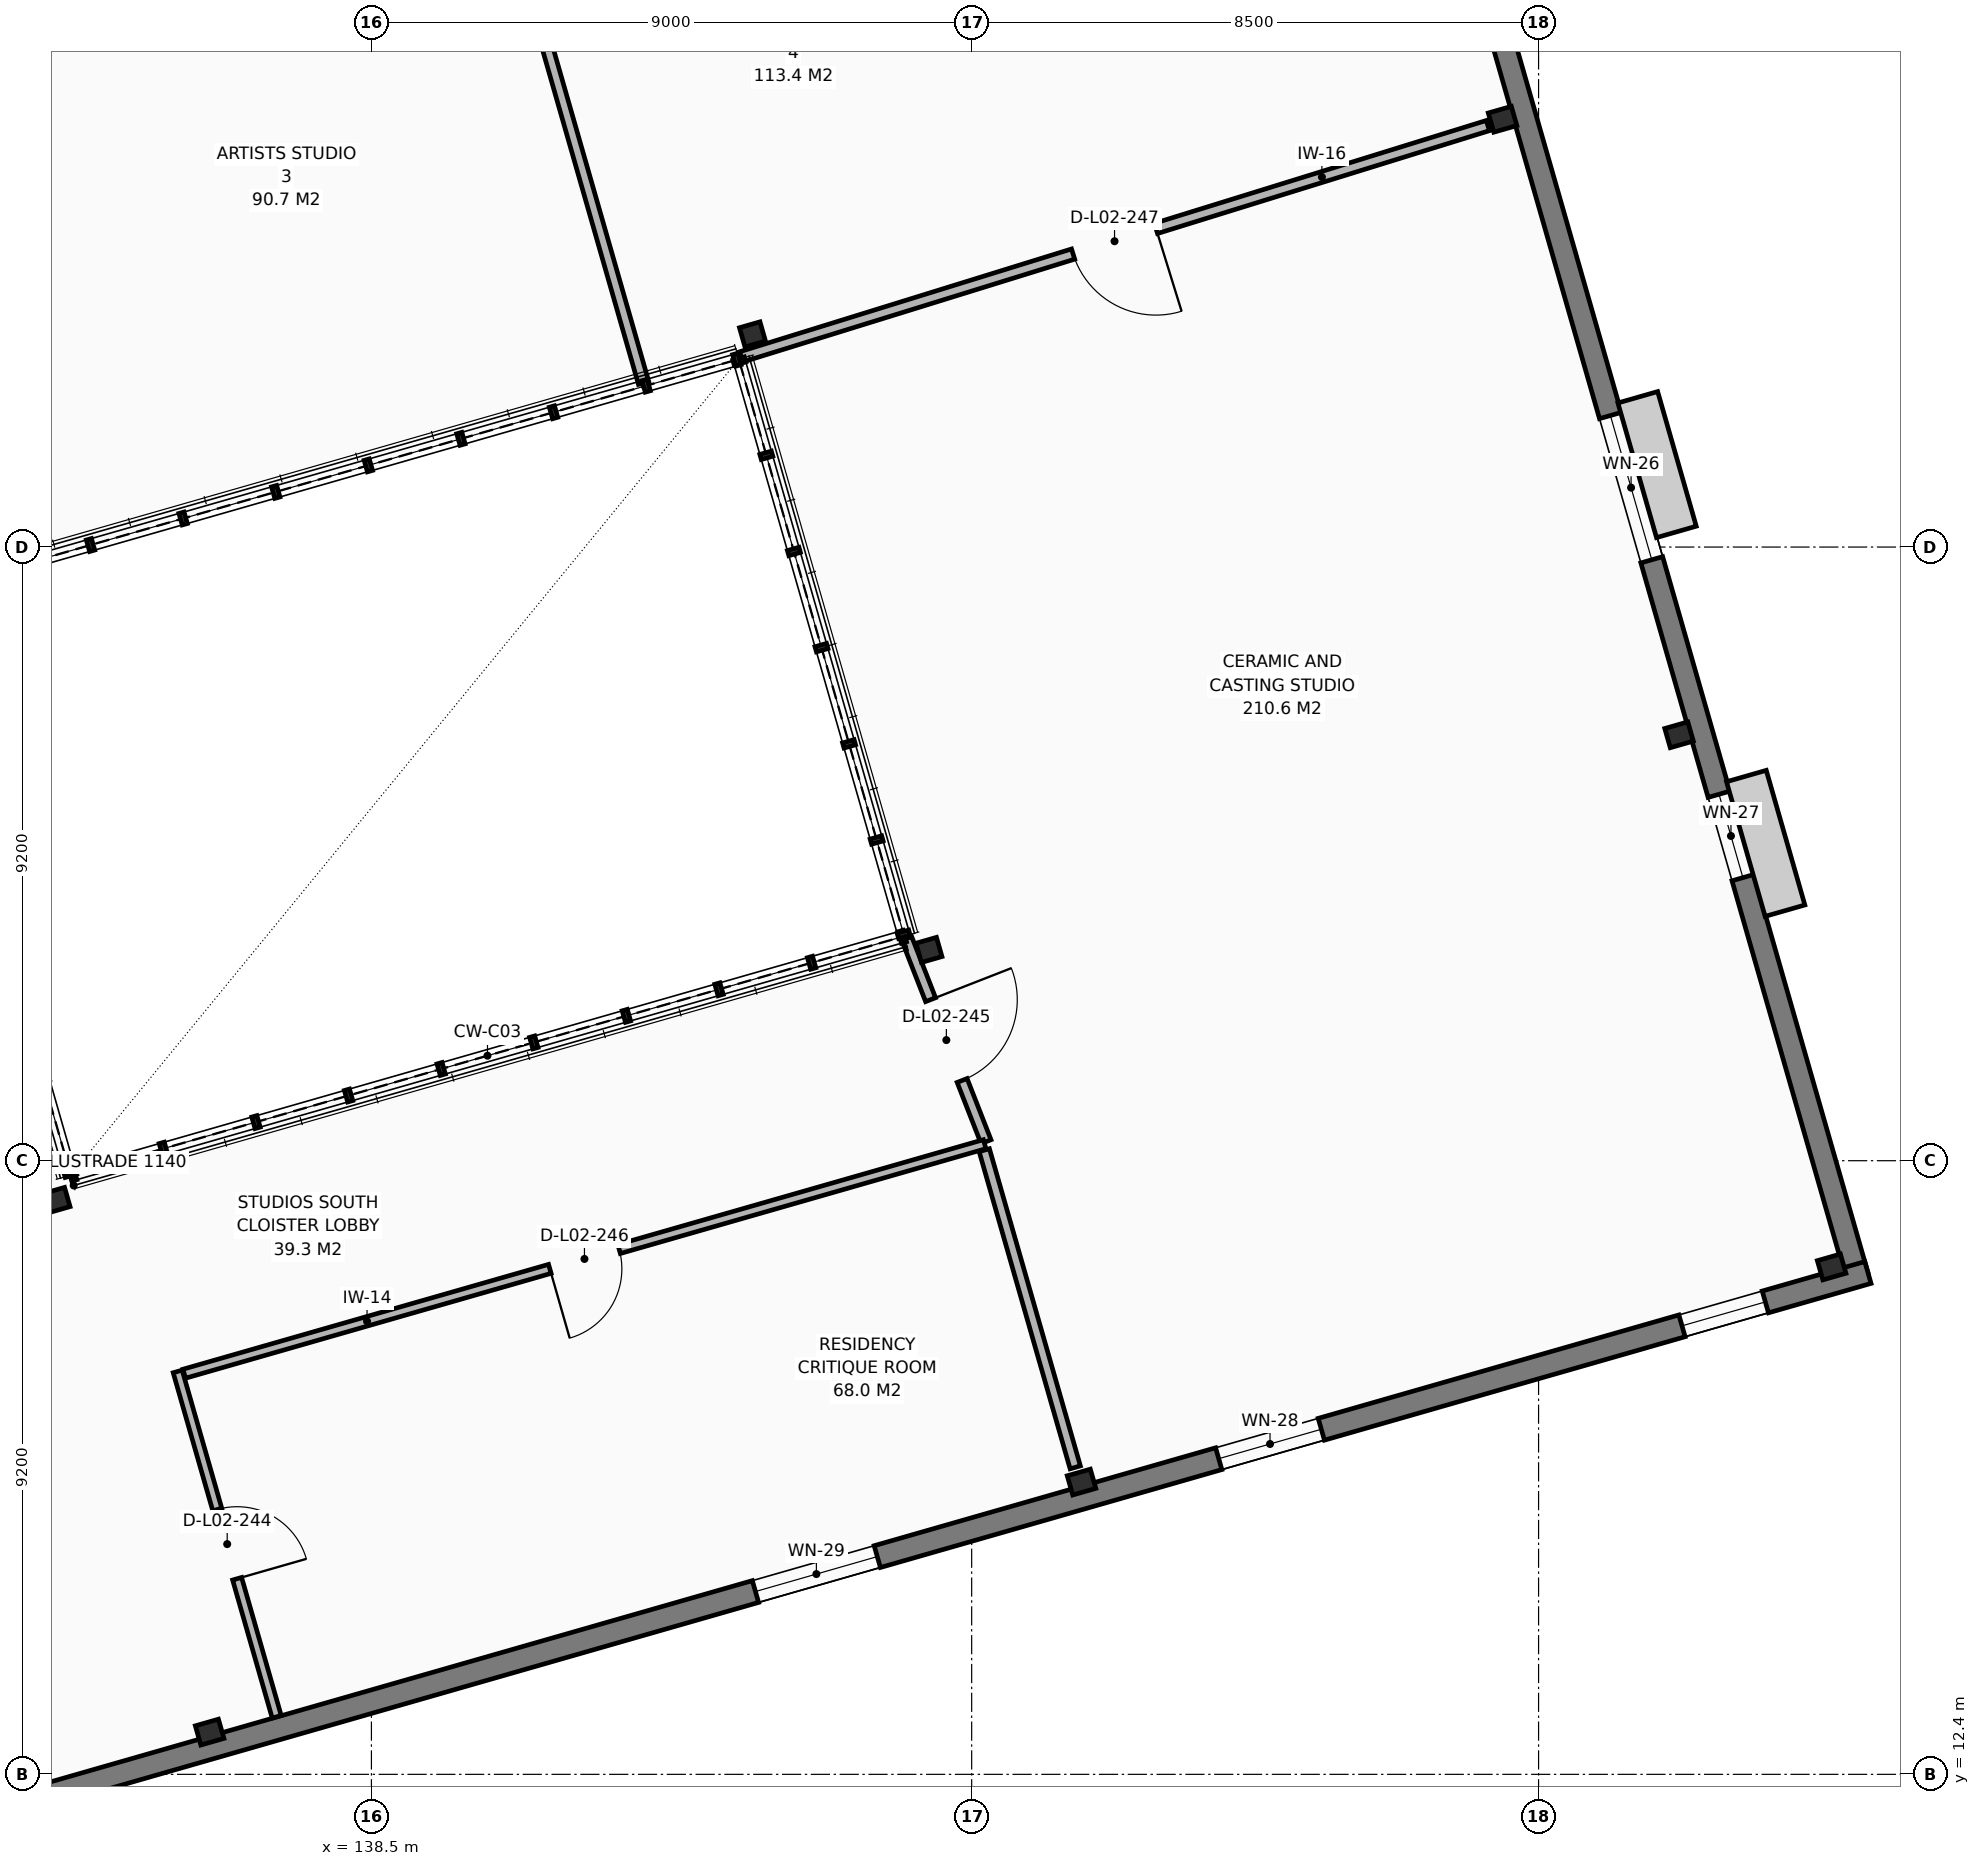
"""IFC4 building model, lengths in metres.
Left out: names, types, materials, properties, quantities, classifications, styles, units other than length and angle.
Written with IfcOpenShell. Run it as: python <this file> out.ifc"""

import sys

from ifc_helpers import new_model, si_unit, direction, frame, frame_2d, origin, origin_2d, place, context, subcontext, project, spatial, rectangle, i_section, extrude, element, fill, save


model = new_model("IFC4")
c1 = context("Model", 3, precision=1e-05, world=origin(), true_north=direction((0.0, 1.0)))
c2 = subcontext(c1, "Body", "Model", "MODEL_VIEW")
j1 = project(units=[si_unit("LENGTHUNIT", "METRE"), si_unit("PLANEANGLEUNIT", "RADIAN")], contexts=[c1])
p1 = place(None, origin())
s1 = spatial("IfcSite", under=j1, at=p1, CompositionType="ELEMENT")
p2 = place(p1, origin())
s2 = spatial("IfcBuilding", under=s1, at=p2, CompositionType="ELEMENT")
p3 = place(p2, frame((0.0, 0.0, 9.52)))
s3 = spatial("IfcBuildingStorey", under=s2, at=p3, CompositionType="ELEMENT", Elevation=9.52)
p4 = place(p3, frame((136.074, 13.033, 0.0), z_axis=(0.0, 0.0, 1.0), x_axis=(0.961261695938, 0.275637355817, 0.0)))
e1 = element("IfcColumn", 1, at=p4, inside=s3, PredefinedType="COLUMN", context=c2, shape_type="SweptSolid", body=[
    extrude(i_section(OverallWidth=0.3, OverallDepth=0.36, WebThickness=0.012, FlangeThickness=0.022, FilletRadius=0.027, at=origin_2d()), origin(), (0.0, 0.0, 1.0), 4.16),
])
p5 = place(p3, frame((133.787, 21.012, 0.0), z_axis=(0.0, 0.0, 1.0), x_axis=(0.961261695938, 0.275637355817, 0.0)))
e2 = element("IfcColumn", 2, at=p5, inside=s3, PredefinedType="COLUMN", context=c2, shape_type="SweptSolid", body=[
    extrude(i_section(OverallWidth=0.3, OverallDepth=0.32, WebThickness=0.011, FlangeThickness=0.021, FilletRadius=0.027, at=origin_2d()), origin(), (0.0, 0.0, 1.0), 4.16),
])
p6 = place(p3, frame((149.147, 16.782, 0.0), z_axis=(0.0, 0.0, 1.0), x_axis=(0.961261695938, 0.275637355817, 0.0)))
e3 = element("IfcColumn", 3, at=p6, inside=s3, PredefinedType="COLUMN", context=c2, shape_type="SweptSolid", body=[
    extrude(i_section(OverallWidth=0.3, OverallDepth=0.36, WebThickness=0.012, FlangeThickness=0.022, FilletRadius=0.027, at=origin_2d()), origin(), (0.0, 0.0, 1.0), 4.16),
])
for number, where, z_axis, x_axis in (
    (4, (146.86, 24.76, 0.0), (0.0, 0.0, 1.0), (0.961, 0.276, 0.0)),
    (5, (144.213, 33.988, 0.0), (0.0, 0.0, 1.0), (0.961, 0.276, 0.0)),
):
    element("IfcColumn", number, at=place(p3, frame(where, z_axis=z_axis, x_axis=x_axis)), inside=s3, PredefinedType="COLUMN", context=c2, shape_type="SweptSolid", body=[
        extrude(i_section(OverallWidth=0.3, OverallDepth=0.32, WebThickness=0.011, FlangeThickness=0.021, FilletRadius=0.027, at=origin_2d()), origin(), (0.0, 0.0, 1.0), 4.16),
    ])
for number, where, z_axis, x_axis in (
    (6, (160.394, 20.007, 0.0), (0.0, 0.0, 1.0), (0.961, 0.276, 0.0)),
    (7, (158.106, 27.985, 0.0), (0.0, 0.0, 1.0), (0.961, 0.276, 0.0)),
    (8, (155.46, 37.213, 0.0), (0.0, 0.0, 1.0), (0.961, 0.276, 0.0)),
):
    element("IfcColumn", number, at=place(p3, frame(where, z_axis=z_axis, x_axis=x_axis)), inside=s3, PredefinedType="COLUMN", context=c2, shape_type="SweptSolid", body=[
        extrude(i_section(OverallWidth=0.3, OverallDepth=0.36, WebThickness=0.012, FlangeThickness=0.022, FilletRadius=0.027, at=origin_2d()), origin(), (0.0, 0.0, 1.0), 4.16),
    ])
p7 = place(p3, frame((117.062, 35.076, 0.0), z_axis=(0.0, 0.0, 1.0), x_axis=(0.961260735733, 0.275640704428, 0.0)))
e9 = element("IfcWall", 9, at=p7, inside=s3, PredefinedType="SOLIDWALL", context=c2, shape_type="SweptSolid", body=[
    extrude(rectangle(XDim=37.83, YDim=0.34, at=frame_2d((18.915, 0.0))), origin(), (0.0, 0.0, 1.0), 3.92),
])
p8 = place(p7, frame((1.6, 0.0, 0.85)))
e10 = element("IfcOpeningElement", 10, at=p8, cuts=e9, PredefinedType="OPENING", context=c2, shape_type="SweptSolid", body=[
    extrude(rectangle(XDim=1.2, YDim=1.4, at=frame_2d((0.6, 0.7))), frame((0.0, 0.18, 0.0), z_axis=(0.0, -1.0, 0.0), x_axis=(1.0, 0.0, 0.0)), (0.0, 0.0, 1.0), 0.36),
])
p9 = place(p7, frame((8.526, 0.0, 0.85)))
e11 = element("IfcOpeningElement", 11, at=p9, cuts=e9, PredefinedType="OPENING", context=c2, shape_type="SweptSolid", body=[
    extrude(rectangle(XDim=1.45, YDim=1.4, at=frame_2d((0.725, 0.7))), frame((0.0, 0.18, 0.0), z_axis=(0.0, -1.0, 0.0), x_axis=(1.0, 0.0, 0.0)), (0.0, 0.0, 1.0), 0.36),
])
p10 = place(p7, frame((15.452, 0.0, 0.85)))
e12 = element("IfcOpeningElement", 12, at=p10, cuts=e9, PredefinedType="OPENING", context=c2, shape_type="SweptSolid", body=[
    extrude(rectangle(XDim=1.65, YDim=1.4, at=frame_2d((0.825, 0.7))), frame((0.0, 0.18, 0.0), z_axis=(0.0, -1.0, 0.0), x_axis=(1.0, 0.0, 0.0)), (0.0, 0.0, 1.0), 0.36),
])
p11 = place(p7, frame((29.304, 0.0, 0.85)))
e13 = element("IfcOpeningElement", 13, at=p11, cuts=e9, PredefinedType="OPENING", context=c2, shape_type="SweptSolid", body=[
    extrude(rectangle(XDim=2.05, YDim=1.4, at=frame_2d((1.025, 0.7))), frame((0.0, 0.18, 0.0), z_axis=(0.0, -1.0, 0.0), x_axis=(1.0, 0.0, 0.0)), (0.0, 0.0, 1.0), 0.36),
])
p12 = place(p3, frame((153.379, 45.667, 0.0), z_axis=(0.0, 0.0, 1.0), x_axis=(0.275644006198, -0.961259788947, 0.0)))
e14 = element("IfcWall", 14, at=p12, inside=s3, PredefinedType="SOLIDWALL", context=c2, shape_type="SweptSolid", body=[
    extrude(rectangle(XDim=26.83, YDim=0.34, at=frame_2d((13.415, 0.0))), origin(), (0.0, 0.0, 1.0), 3.92),
])
p13 = place(p12, frame((1.6, 0.0, 0.85)))
e15 = element("IfcOpeningElement", 15, at=p13, cuts=e14, PredefinedType="OPENING", context=c2, shape_type="SweptSolid", body=[
    extrude(rectangle(XDim=1.85, YDim=1.4, at=frame_2d((0.925, 0.7))), frame((0.0, 0.18, 0.0), z_axis=(0.0, -1.0, 0.0), x_axis=(1.0, 0.0, 0.0)), (0.0, 0.0, 1.0), 0.36),
])
p14 = place(p12, frame((13.415, 0.0, 0.85)))
e16 = element("IfcOpeningElement", 16, at=p14, cuts=e14, PredefinedType="OPENING", context=c2, shape_type="SweptSolid", body=[
    extrude(rectangle(XDim=2.25, YDim=1.4, at=frame_2d((1.125, 0.7))), frame((0.0, 0.18, 0.0), z_axis=(0.0, -1.0, 0.0), x_axis=(1.0, 0.0, 0.0)), (0.0, 0.0, 1.0), 0.36),
])
p15 = place(p12, frame((19.323, 0.0, 0.85)))
e17 = element("IfcOpeningElement", 17, at=p15, cuts=e14, PredefinedType="OPENING", context=c2, shape_type="SweptSolid", body=[
    extrude(rectangle(XDim=1.3, YDim=1.6, at=frame_2d((0.65, 0.8))), frame((0.0, 0.18, 0.0), z_axis=(0.0, -1.0, 0.0), x_axis=(1.0, 0.0, 0.0)), (0.0, 0.0, 1.0), 0.36),
])
p16 = place(p3, frame((160.938, 19.924, 0.0), z_axis=(0.0, 0.0, 1.0), x_axis=(-0.961260735733, -0.275640704428, 0.0)))
e18 = element("IfcWall", 18, at=p16, inside=s3, PredefinedType="SOLIDWALL", context=c2, shape_type="SweptSolid", body=[
    extrude(rectangle(XDim=37.83, YDim=0.34, at=frame_2d((18.915, 0.0))), origin(), (0.0, 0.0, 1.0), 3.92),
])
p17 = place(p16, frame((1.6, 0.0, 0.85)))
e19 = element("IfcOpeningElement", 19, at=p17, cuts=e18, PredefinedType="OPENING", context=c2, shape_type="SweptSolid", body=[
    extrude(rectangle(XDim=1.3, YDim=1.6, at=frame_2d((0.65, 0.8))), frame((0.0, 0.18, 0.0), z_axis=(0.0, -1.0, 0.0), x_axis=(1.0, 0.0, 0.0)), (0.0, 0.0, 1.0), 0.36),
])
p18 = place(p16, frame((8.526, 0.0, 0.85)))
e20 = element("IfcOpeningElement", 20, at=p18, cuts=e18, PredefinedType="OPENING", context=c2, shape_type="SweptSolid", body=[
    extrude(rectangle(XDim=1.6, YDim=1.6, at=frame_2d((0.8, 0.8))), frame((0.0, 0.18, 0.0), z_axis=(0.0, -1.0, 0.0), x_axis=(1.0, 0.0, 0.0)), (0.0, 0.0, 1.0), 0.36),
])
p19 = place(p16, frame((15.452, 0.0, 0.85)))
e21 = element("IfcOpeningElement", 21, at=p19, cuts=e18, PredefinedType="OPENING", context=c2, shape_type="SweptSolid", body=[
    extrude(rectangle(XDim=1.9, YDim=1.6, at=frame_2d((0.95, 0.8))), frame((0.0, 0.18, 0.0), z_axis=(0.0, -1.0, 0.0), x_axis=(1.0, 0.0, 0.0)), (0.0, 0.0, 1.0), 0.36),
])
p20 = place(p16, frame((29.304, 0.0, 0.85)))
e22 = element("IfcOpeningElement", 22, at=p20, cuts=e18, PredefinedType="OPENING", context=c2, shape_type="SweptSolid", body=[
    extrude(rectangle(XDim=1.35, YDim=1.5, at=frame_2d((0.675, 0.75))), frame((0.0, 0.18, 0.0), z_axis=(0.0, -1.0, 0.0), x_axis=(1.0, 0.0, 0.0)), (0.0, 0.0, 1.0), 0.36),
])
p21 = place(p3, frame((135.595, 18.441, 0.0), z_axis=(0.0, 0.0, 1.0), x_axis=(0.275636962286, -0.961261808781, 0.0)))
e23 = element("IfcWall", 23, at=p21, inside=s3, PredefinedType="PARTITIONING", context=c2, shape_type="SweptSolid", body=[
    extrude(rectangle(XDim=5.386, YDim=0.14, at=frame_2d((2.693, 0.0))), origin(), (0.0, 0.0, 1.0), 3.41),
])
p22 = place(p21, frame((2.153, 0.0, 0.0)))
e24 = element("IfcOpeningElement", 24, at=p22, cuts=e23, PredefinedType="OPENING", context=c2, shape_type="SweptSolid", body=[
    extrude(rectangle(XDim=1.08, YDim=2.12, at=frame_2d((0.54, 1.06))), frame((0.0, 0.08, 0.0), z_axis=(0.0, -1.0, 0.0), x_axis=(1.0, 0.0, 0.0)), (0.0, 0.0, 1.0), 0.16),
])
p23 = place(p3, frame((146.525, 24.932, 0.0), z_axis=(0.0, 0.0, 1.0), x_axis=(0.363735192139, -0.931502393985, 0.0)))
e25 = element("IfcWall", 25, at=p23, inside=s3, PredefinedType="PARTITIONING", context=c2, shape_type="SweptSolid", body=[
    extrude(rectangle(XDim=3.271, YDim=0.16, at=frame_2d((1.636, 0.0))), origin(), (0.0, 0.0, 1.0), 3.41),
])
p24 = place(p23, frame((0.986, 0.0, 0.0)))
e26 = element("IfcOpeningElement", 26, at=p24, cuts=e25, PredefinedType="OPENING", context=c2, shape_type="SweptSolid", body=[
    extrude(rectangle(XDim=1.3, YDim=2.15, at=frame_2d((0.65, 1.075))), frame((0.0, 0.09, 0.0), z_axis=(0.0, -1.0, 0.0), x_axis=(1.0, 0.0, 0.0)), (0.0, 0.0, 1.0), 0.18),
])
p25 = place(p3, frame((147.695, 21.848, 0.0), z_axis=(0.0, 0.0, 1.0), x_axis=(-0.961259327695, -0.275645614728, 0.0)))
e27 = element("IfcWall", 27, at=p25, inside=s3, PredefinedType="PARTITIONING", context=c2, shape_type="SweptSolid", body=[
    extrude(rectangle(XDim=12.485, YDim=0.14, at=frame_2d((6.242, 0.0))), origin(), (0.0, 0.0, 1.0), 3.46),
])
p26 = place(p25, frame((5.702, 0.0, 0.0)))
e28 = element("IfcOpeningElement", 28, at=p26, cuts=e27, PredefinedType="OPENING", context=c2, shape_type="SweptSolid", body=[
    extrude(rectangle(XDim=1.08, YDim=2.12, at=frame_2d((0.54, 1.06))), frame((0.0, 0.08, 0.0), z_axis=(0.0, -1.0, 0.0), x_axis=(1.0, 0.0, 0.0)), (0.0, 0.0, 1.0), 0.16),
])
p27 = place(p3, frame((140.209, 41.533, 0.0), z_axis=(0.0, 0.0, 1.0), x_axis=(0.275609027471, -0.961269818509, 0.0)))
e29 = element("IfcWall", 29, at=p27, inside=s3, PredefinedType="PARTITIONING", context=c2, shape_type="SweptSolid", body=[
    extrude(rectangle(XDim=8.606, YDim=0.16, at=frame_2d((4.303, 0.0))), origin(), (0.0, 0.0, 1.0), 3.41),
])
p28 = place(p3, frame((155.24, 37.119, 0.0), z_axis=(0.0, 0.0, 1.0), x_axis=(-0.955222404678, -0.295888758828, 0.0)))
e30 = element("IfcWall", 30, at=p28, inside=s3, PredefinedType="PARTITIONING", context=c2, shape_type="SweptSolid", body=[
    extrude(rectangle(XDim=11.72, YDim=0.16, at=frame_2d((5.86, 0.0))), origin(), (0.0, 0.0, 1.0), 3.41),
])
p29 = place(p28, frame((5.21, 0.0, 0.0)))
e31 = element("IfcOpeningElement", 31, at=p29, cuts=e30, PredefinedType="OPENING", context=c2, shape_type="SweptSolid", body=[
    extrude(rectangle(XDim=1.3, YDim=2.15, at=frame_2d((0.65, 1.075))), frame((0.0, 0.09, 0.0), z_axis=(0.0, -1.0, 0.0), x_axis=(1.0, 0.0, 0.0)), (0.0, 0.0, 1.0), 0.18),
])
p30 = place(p3, frame((149.053, 17.002, 0.0), z_axis=(0.0, 0.0, 1.0), x_axis=(-0.275613946292, 0.961268408203, 0.0)))
e32 = element("IfcWall", 32, at=p30, inside=s3, PredefinedType="PARTITIONING", context=c2, shape_type="SweptSolid", body=[
    extrude(rectangle(XDim=4.947, YDim=0.16, at=frame_2d((2.474, 0.0))), origin(), (0.0, 0.0, 1.0), 3.41),
])
p31 = place(p14, origin())
e33 = element("IfcWindow", 33, at=p31, inside=s3, PartitioningType="SINGLE_PANEL", PredefinedType="WINDOW", context=c2, shape_type="SweptSolid", body=[
    extrude(rectangle(XDim=2.25, YDim=1.4, at=frame_2d((1.125, 0.7))), frame((0.0, 0.03, 0.0), z_axis=(0.0, -1.0, 0.0), x_axis=(1.0, 0.0, 0.0)), (0.0, 0.0, 1.0), 0.06),
])
fill(e16, e33)
p32 = place(p15, origin())
e34 = element("IfcWindow", 34, at=p32, inside=s3, PartitioningType="SINGLE_PANEL", PredefinedType="WINDOW", context=c2, shape_type="SweptSolid", body=[
    extrude(rectangle(XDim=1.3, YDim=1.6, at=frame_2d((0.65, 0.8))), frame((0.0, 0.03, 0.0), z_axis=(0.0, -1.0, 0.0), x_axis=(1.0, 0.0, 0.0)), (0.0, 0.0, 1.0), 0.06),
])
fill(e17, e34)
p33 = place(p17, origin())
e35 = element("IfcWindow", 35, at=p33, inside=s3, PartitioningType="SINGLE_PANEL", PredefinedType="WINDOW", context=c2, shape_type="SweptSolid", body=[
    extrude(rectangle(XDim=1.3, YDim=1.6, at=frame_2d((0.65, 0.8))), frame((0.0, 0.03, 0.0), z_axis=(0.0, -1.0, 0.0), x_axis=(1.0, 0.0, 0.0)), (0.0, 0.0, 1.0), 0.06),
])
fill(e19, e35)
p34 = place(p18, origin())
e36 = element("IfcWindow", 36, at=p34, inside=s3, PartitioningType="SINGLE_PANEL", PredefinedType="WINDOW", context=c2, shape_type="SweptSolid", body=[
    extrude(rectangle(XDim=1.6, YDim=1.6, at=frame_2d((0.8, 0.8))), frame((0.0, 0.03, 0.0), z_axis=(0.0, -1.0, 0.0), x_axis=(1.0, 0.0, 0.0)), (0.0, 0.0, 1.0), 0.06),
])
fill(e20, e36)
p35 = place(p19, origin())
e37 = element("IfcWindow", 37, at=p35, inside=s3, PartitioningType="SINGLE_PANEL", PredefinedType="WINDOW", context=c2, shape_type="SweptSolid", body=[
    extrude(rectangle(XDim=1.9, YDim=1.6, at=frame_2d((0.95, 0.8))), frame((0.0, 0.03, 0.0), z_axis=(0.0, -1.0, 0.0), x_axis=(1.0, 0.0, 0.0)), (0.0, 0.0, 1.0), 0.06),
])
fill(e21, e37)
p36 = place(p22, origin())
e38 = element("IfcDoor", 38, at=p36, inside=s3, OperationType="SINGLE_SWING_RIGHT", PredefinedType="DOOR", context=c2, shape_type="SweptSolid", body=[
    extrude(rectangle(XDim=1.08, YDim=2.12, at=frame_2d((0.54, 1.06))), frame((0.0, 0.025, 0.0), z_axis=(0.0, -1.0, 0.0), x_axis=(1.0, 0.0, 0.0)), (0.0, 0.0, 1.0), 0.05),
])
fill(e24, e38)
p37 = place(p24, origin())
e39 = element("IfcDoor", 39, at=p37, inside=s3, OperationType="SINGLE_SWING_LEFT", PredefinedType="DOOR", context=c2, shape_type="SweptSolid", body=[
    extrude(rectangle(XDim=1.3, YDim=2.15, at=frame_2d((0.65, 1.075))), frame((0.0, 0.025, 0.0), z_axis=(0.0, -1.0, 0.0), x_axis=(1.0, 0.0, 0.0)), (0.0, 0.0, 1.0), 0.05),
])
fill(e26, e39)
p38 = place(p26, origin())
e40 = element("IfcDoor", 40, at=p38, inside=s3, OperationType="SINGLE_SWING_RIGHT", PredefinedType="DOOR", context=c2, shape_type="SweptSolid", body=[
    extrude(rectangle(XDim=1.08, YDim=2.12, at=frame_2d((0.54, 1.06))), frame((0.0, 0.025, 0.0), z_axis=(0.0, -1.0, 0.0), x_axis=(1.0, 0.0, 0.0)), (0.0, 0.0, 1.0), 0.05),
])
fill(e28, e40)
p39 = place(p29, origin())
e41 = element("IfcDoor", 41, at=p39, inside=s3, OperationType="SINGLE_SWING_LEFT", PredefinedType="DOOR", context=c2, shape_type="SweptSolid", body=[
    extrude(rectangle(XDim=1.3, YDim=2.15, at=frame_2d((0.65, 1.075))), frame((0.0, 0.025, 0.0), z_axis=(0.0, -1.0, 0.0), x_axis=(1.0, 0.0, 0.0)), (0.0, 0.0, 1.0), 0.05),
])
fill(e31, e41)
save(model, sys.argv[1])
